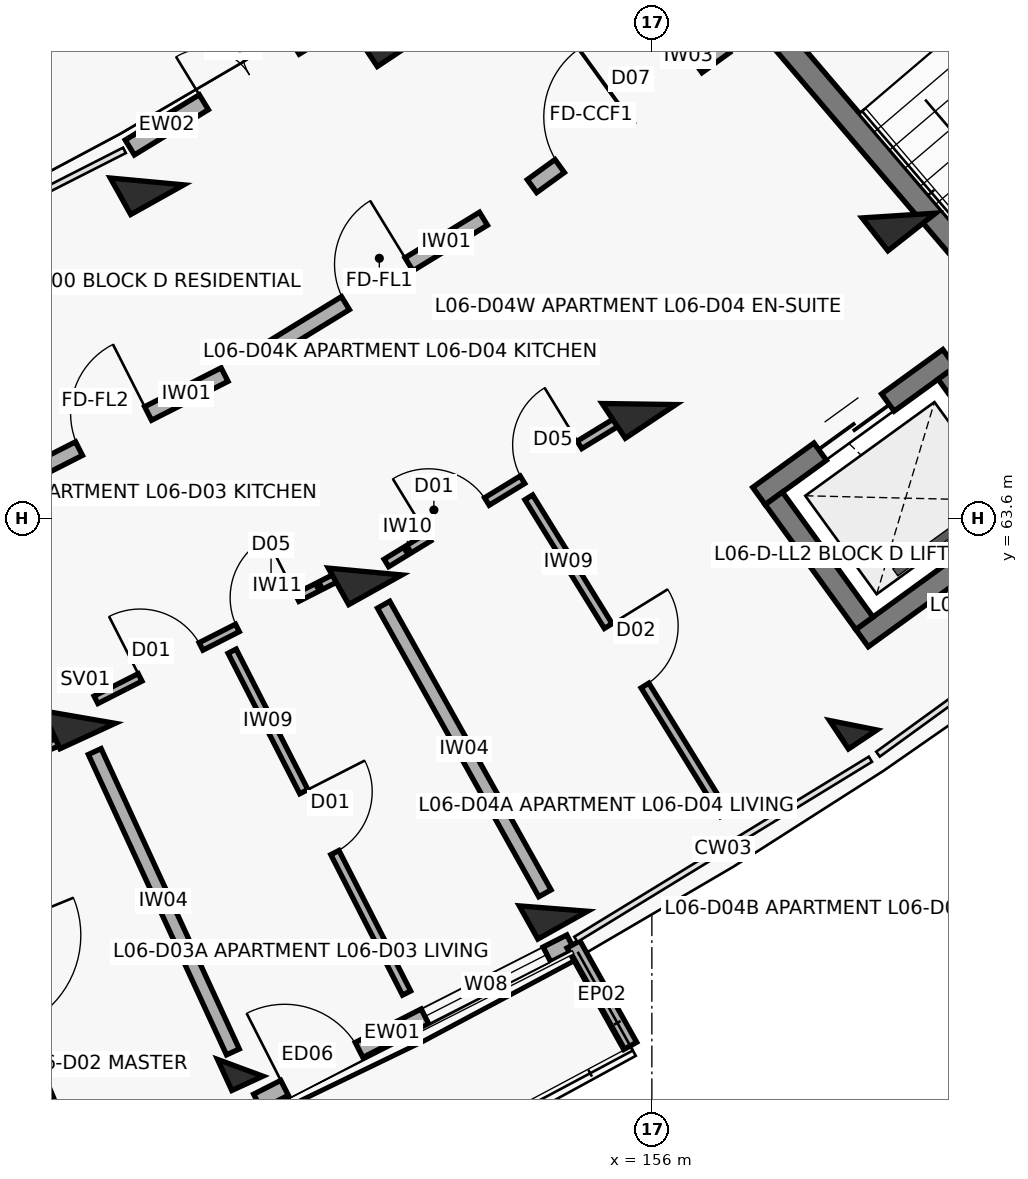
"""IFC4 building model, lengths in metres.
Left out: names, types, materials, properties, quantities, classifications, styles, units other than length and angle.
Written with IfcOpenShell. Run it as: python <this file> out.ifc"""

import sys

from ifc_helpers import new_model, si_unit, direction, frame, frame_2d, origin, origin_2d, place, context, subcontext, project, spatial, rectangle, extrude, element, fill, save


model = new_model("IFC4")
c1 = context("Model", 3, precision=1e-05, world=origin(), true_north=direction((0.0, 1.0)))
c2 = subcontext(c1, "Body", "Model", "MODEL_VIEW")
j1 = project(units=[si_unit("LENGTHUNIT", "METRE"), si_unit("PLANEANGLEUNIT", "RADIAN")], contexts=[c1])
p1 = place(None, origin())
s1 = spatial("IfcSite", under=j1, at=p1, CompositionType="ELEMENT")
p2 = place(p1, origin())
s2 = spatial("IfcBuilding", under=s1, at=p2, CompositionType="ELEMENT")
p3 = place(p2, frame((0.0, 0.0, 20.5)))
s3 = spatial("IfcBuildingStorey", under=s2, at=p3, CompositionType="ELEMENT", Elevation=20.5)
p4 = place(p3, frame((148.461, 60.982, 0.0), z_axis=(0.0, 0.0, 1.0), x_axis=(0.417867073801, -0.908508177527, 0.0)))
e1 = element("IfcColumn", 1, at=p4, inside=s3, PredefinedType="COLUMN", context=c2, shape_type="SweptSolid", body=[
    extrude(rectangle(XDim=0.55, YDim=0.8, at=origin_2d()), origin(), (0.0, 0.0, 1.0), 3.1),
])
p5 = place(p3, frame((150.584, 56.367, 0.0), z_axis=(0.0, 0.0, 1.0), x_axis=(0.417867073801, -0.908508177527, 0.0)))
e2 = element("IfcColumn", 2, at=p5, inside=s3, PredefinedType="COLUMN", context=c2, shape_type="SweptSolid", body=[
    extrude(rectangle(XDim=0.45, YDim=0.45, at=origin_2d()), origin(), (0.0, 0.0, 1.0), 3.1),
])
for number, where, z_axis, x_axis in (
    (3, (149.358, 68.03, 0.0), (0.0, 0.0, 1.0), (0.488, -0.873, 0.0)),
    (4, (152.227, 62.897, 0.0), (0.0, 0.0, 1.0), (0.488, -0.873, 0.0)),
):
    element("IfcColumn", number, at=place(p3, frame(where, z_axis=z_axis, x_axis=x_axis)), inside=s3, PredefinedType="COLUMN", context=c2, shape_type="SweptSolid", body=[
        extrude(rectangle(XDim=0.55, YDim=0.8, at=origin_2d()), origin(), (0.0, 0.0, 1.0), 3.1),
    ])
p6 = place(p3, frame((154.705, 58.462, 0.0), z_axis=(0.0, 0.0, 1.0), x_axis=(0.487859659139, -0.87292207727, 0.0)))
e5 = element("IfcColumn", 5, at=p6, inside=s3, PredefinedType="COLUMN", context=c2, shape_type="SweptSolid", body=[
    extrude(rectangle(XDim=0.5, YDim=0.75, at=origin_2d()), origin(), (0.0, 0.0, 1.0), 3.1),
])
for number, where, z_axis, x_axis in (
    (6, (152.568, 69.993, 0.0), (0.0, 0.0, 1.0), (0.555, -0.832, 0.0)),
    (7, (155.831, 65.101, 0.0), (0.0, 0.0, 1.0), (0.555, -0.832, 0.0)),
):
    element("IfcColumn", number, at=place(p3, frame(where, z_axis=z_axis, x_axis=x_axis)), inside=s3, PredefinedType="COLUMN", context=c2, shape_type="SweptSolid", body=[
        extrude(rectangle(XDim=0.55, YDim=0.8, at=origin_2d()), origin(), (0.0, 0.0, 1.0), 3.1),
    ])
p7 = place(p3, frame((158.649, 60.875, 0.0), z_axis=(0.0, 0.0, 1.0), x_axis=(0.554844427448, -0.83195412213, 0.0)))
e8 = element("IfcColumn", 8, at=p7, inside=s3, PredefinedType="COLUMN", context=c2, shape_type="SweptSolid", body=[
    extrude(rectangle(XDim=0.45, YDim=0.45, at=origin_2d()), origin(), (0.0, 0.0, 1.0), 3.1),
])
p8 = place(p3, frame((159.25, 67.581, 0.0), z_axis=(0.0, 0.0, 1.0), x_axis=(0.618408395358, -0.785856893175, 0.0)))
e9 = element("IfcColumn", 9, at=p8, inside=s3, PredefinedType="COLUMN", context=c2, shape_type="SweptSolid", body=[
    extrude(rectangle(XDim=0.55, YDim=0.8, at=origin_2d()), origin(), (0.0, 0.0, 1.0), 3.1),
])
p9 = place(p3, frame((150.811, 55.922, 0.0), z_axis=(0.0, 0.0, 1.0), x_axis=(0.891407190547, 0.453203288428, 0.0)))
e10 = element("IfcWall", 10, at=p9, inside=s3, PredefinedType="SOLIDWALL", context=c2, shape_type="SweptSolid", body=[
    extrude(rectangle(XDim=4.623, YDim=0.22, at=frame_2d((2.311, 0.0))), origin(), (0.0, 0.0, 1.0), 2.25),
])
p10 = place(p9, frame((0.4, 0.0, 0.0)))
e11 = element("IfcOpeningElement", 11, at=p10, cuts=e10, PredefinedType="OPENING", context=c2, shape_type="SweptSolid", body=[
    extrude(rectangle(XDim=1.1, YDim=2.15, at=frame_2d((0.55, 1.075))), frame((0.0, 0.12, 0.0), z_axis=(0.0, -1.0, 0.0), x_axis=(1.0, 0.0, 0.0)), (0.0, 0.0, 1.0), 0.24),
])
p11 = place(p9, frame((2.472, 0.0, 0.35)))
e12 = element("IfcOpeningElement", 12, at=p11, cuts=e10, PredefinedType="OPENING", context=c2, shape_type="SweptSolid", body=[
    extrude(rectangle(XDim=1.8, YDim=1.65, at=frame_2d((0.9, 0.825))), frame((0.0, 0.12, 0.0), z_axis=(0.0, -1.0, 0.0), x_axis=(1.0, 0.0, 0.0)), (0.0, 0.0, 1.0), 0.24),
])
p12 = place(p3, frame((154.969, 57.991, 0.0), z_axis=(0.0, 0.0, 1.0), x_axis=(0.487971560724, -0.872859528175, 0.0)))
e13 = element("IfcWall", 13, at=p12, inside=s3, PredefinedType="PARAPET", context=c2, shape_type="SweptSolid", body=[
    extrude(rectangle(XDim=1.53, YDim=0.195, at=frame_2d((0.765, 0.0))), origin(), (0.0, 0.0, 1.0), 2.25),
])
p13 = place(p3, frame((149.131, 68.477, 0.0), z_axis=(0.0, 0.0, 1.0), x_axis=(0.853122864819, 0.5217100512, 0.0)))
e14 = element("IfcWall", 14, at=p13, inside=s3, PredefinedType="SOLIDWALL", context=c2, shape_type="SweptSolid", body=[
    extrude(rectangle(XDim=3.683, YDim=0.23, at=frame_2d((1.842, 0.0))), origin(), (0.0, 0.0, 1.0), 2.25),
])
p14 = place(p13, frame((1.142, 0.0, 0.0)))
e15 = element("IfcOpeningElement", 15, at=p14, cuts=e14, PredefinedType="OPENING", context=c2, shape_type="SweptSolid", body=[
    extrude(rectangle(XDim=1.4, YDim=2.15, at=frame_2d((0.7, 1.075))), frame((0.0, 0.125, 0.0), z_axis=(0.0, -1.0, 0.0), x_axis=(1.0, 0.0, 0.0)), (0.0, 0.0, 1.0), 0.25),
])
p15 = place(p3, frame((144.583, 69.413, 0.0), z_axis=(0.0, 0.0, 1.0), x_axis=(0.863173571148, 0.504907304435, 0.0)))
e16 = element("IfcWall", 16, at=p15, inside=s3, PredefinedType="PARAPET", context=c2, shape_type="SweptSolid", body=[
    extrude(rectangle(XDim=8.727, YDim=0.18, at=frame_2d((4.364, 0.0))), origin(), (0.0, 0.0, 1.0), 0.25),
])
p16 = place(p3, frame((157.583, 70.041, 0.0), z_axis=(0.0, 0.0, 1.0), x_axis=(0.648762810187, -0.760990680704, 0.0)))
e17 = element("IfcWall", 17, at=p16, inside=s3, PredefinedType="SHEAR", context=c2, shape_type="SweptSolid", body=[
    extrude(rectangle(XDim=7.69, YDim=0.3, at=frame_2d((3.845, 0.0))), origin(), (0.0, 0.0, 1.0), 3.1),
])
p17 = place(p3, frame((157.409, 63.89, 0.0), z_axis=(0.0, 0.0, 1.0), x_axis=(0.809510936031, 0.587104798521, 0.0)))
e18 = element("IfcWall", 18, at=p17, inside=s3, PredefinedType="SHEAR", context=c2, shape_type="SweptSolid", body=[
    extrude(rectangle(XDim=3.09, YDim=0.28, at=frame_2d((1.545, 0.0))), origin(), (0.0, 0.0, 1.0), 3.1),
])
p18 = place(p17, frame((0.995, 0.0, 0.0)))
e19 = element("IfcOpeningElement", 19, at=p18, cuts=e18, PredefinedType="OPENING", context=c2, shape_type="SweptSolid", body=[
    extrude(rectangle(XDim=1.1, YDim=2.15, at=frame_2d((0.55, 1.075))), frame((0.0, 0.15, 0.0), z_axis=(0.0, -1.0, 0.0), x_axis=(1.0, 0.0, 0.0)), (0.0, 0.0, 1.0), 0.3),
])
p19 = place(p3, frame((158.765, 62.021, 0.0), z_axis=(0.0, 0.0, 1.0), x_axis=(0.809548485838, 0.587053020669, 0.0)))
e20 = element("IfcWall", 20, at=p19, inside=s3, PredefinedType="SHEAR", context=c2, shape_type="SweptSolid", body=[
    extrude(rectangle(XDim=3.09, YDim=0.28, at=frame_2d((1.545, 0.0))), origin(), (0.0, 0.0, 1.0), 3.1),
])
p20 = place(p3, frame((157.604, 63.859, 0.0), z_axis=(0.0, 0.0, 1.0), x_axis=(0.587127188998, -0.809494696671, 0.0)))
e21 = element("IfcWall", 21, at=p20, inside=s3, PredefinedType="SHEAR", context=c2, shape_type="SweptSolid", body=[
    extrude(rectangle(XDim=2.03, YDim=0.28, at=frame_2d((1.015, 0.0))), origin(), (0.0, 0.0, 1.0), 3.1),
])
p21 = place(p3, frame((159.879, 65.509, 0.0), z_axis=(0.0, 0.0, 1.0), x_axis=(0.58704837408, -0.809551855344, 0.0)))
e22 = element("IfcWall", 22, at=p21, inside=s3, PredefinedType="SHEAR", context=c2, shape_type="SweptSolid", body=[
    extrude(rectangle(XDim=2.03, YDim=0.28, at=frame_2d((1.015, 0.0))), origin(), (0.0, 0.0, 1.0), 3.1),
])
p22 = place(p3, frame((144.903, 59.296, 0.0), z_axis=(0.0, 0.0, 1.0), x_axis=(0.924207914011, 0.381889685223, 0.0)))
e23 = element("IfcWall", 23, at=p22, inside=s3, PredefinedType="PARTITIONING", context=c2, shape_type="SweptSolid", body=[
    extrude(rectangle(XDim=3.64, YDim=0.105, at=frame_2d((1.82, 0.0))), origin(), (0.0, 0.0, 1.0), 2.08),
])
p23 = place(p22, frame((0.65, 0.0, 0.0)))
e24 = element("IfcOpeningElement", 24, at=p23, cuts=e23, PredefinedType="OPENING", context=c2, shape_type="SweptSolid", body=[
    extrude(rectangle(XDim=0.9, YDim=2.1, at=frame_2d((0.45, 1.05))), frame((0.0, 0.062, 0.0), z_axis=(0.0, -1.0, 0.0), x_axis=(1.0, 0.0, 0.0)), (0.0, 0.0, 1.0), 0.125),
])
p24 = place(p22, frame((2.11, 0.0, 0.0)))
e25 = element("IfcOpeningElement", 25, at=p24, cuts=e23, PredefinedType="OPENING", context=c2, shape_type="SweptSolid", body=[
    extrude(rectangle(XDim=0.88, YDim=2.1, at=frame_2d((0.44, 1.05))), frame((0.0, 0.062, 0.0), z_axis=(0.0, -1.0, 0.0), x_axis=(1.0, 0.0, 0.0)), (0.0, 0.0, 1.0), 0.125),
])
p25 = place(p3, frame((146.533, 59.708, 0.0), z_axis=(0.0, 0.0, 1.0), x_axis=(0.379167145653, -0.925328198888, 0.0)))
e26 = element("IfcWall", 26, at=p25, inside=s3, PredefinedType="PARTITIONING", context=c2, shape_type="SweptSolid", body=[
    extrude(rectangle(XDim=4.75, YDim=0.12, at=frame_2d((2.375, 0.0))), origin(), (0.0, 0.0, 1.0), 2.08),
])
p26 = place(p25, frame((1.725, 0.0, 0.0)))
e27 = element("IfcOpeningElement", 27, at=p26, cuts=e26, PredefinedType="OPENING", context=c2, shape_type="SweptSolid", body=[
    extrude(rectangle(XDim=1.3, YDim=2.1, at=frame_2d((0.65, 1.05))), frame((0.0, 0.07, 0.0), z_axis=(0.0, -1.0, 0.0), x_axis=(1.0, 0.0, 0.0)), (0.0, 0.0, 1.0), 0.14),
])
p27 = place(p3, frame((147.457, 64.003, 0.0), z_axis=(0.0, 0.0, 1.0), x_axis=(0.891412167565, 0.45319349898, 0.0)))
e28 = element("IfcWall", 28, at=p27, inside=s3, PredefinedType="SOLIDWALL", context=c2, shape_type="SweptSolid", body=[
    extrude(rectangle(XDim=3.277, YDim=0.2, at=frame_2d((1.639, 0.0))), origin(), (0.0, 0.0, 1.0), 2.08),
])
p28 = place(p27, frame((1.128, 0.0, 0.0)))
e29 = element("IfcOpeningElement", 29, at=p28, cuts=e28, PredefinedType="OPENING", context=c2, shape_type="SweptSolid", body=[
    extrude(rectangle(XDim=1.02, YDim=2.15, at=frame_2d((0.51, 1.075))), frame((0.0, 0.11, 0.0), z_axis=(0.0, -1.0, 0.0), x_axis=(1.0, 0.0, 0.0)), (0.0, 0.0, 1.0), 0.22),
])
p29 = place(p3, frame((148.687, 61.209, 0.0), z_axis=(0.0, 0.0, 1.0), x_axis=(0.891396224028, 0.453224857866, 0.0)))
e30 = element("IfcWall", 30, at=p29, inside=s3, PredefinedType="PARTITIONING", context=c2, shape_type="SweptSolid", body=[
    extrude(rectangle(XDim=3.617, YDim=0.11, at=frame_2d((1.808, 0.0))), origin(), (0.0, 0.0, 1.0), 2.08),
])
p30 = place(p29, frame((0.65, 0.0, 0.0)))
e31 = element("IfcOpeningElement", 31, at=p30, cuts=e30, PredefinedType="OPENING", context=c2, shape_type="SweptSolid", body=[
    extrude(rectangle(XDim=0.9, YDim=2.1, at=frame_2d((0.45, 1.05))), frame((0.0, 0.065, 0.0), z_axis=(0.0, -1.0, 0.0), x_axis=(1.0, 0.0, 0.0)), (0.0, 0.0, 1.0), 0.13),
])
p31 = place(p29, frame((2.086, 0.0, 0.0)))
e32 = element("IfcOpeningElement", 32, at=p31, cuts=e30, PredefinedType="OPENING", context=c2, shape_type="SweptSolid", body=[
    extrude(rectangle(XDim=0.88, YDim=2.1, at=frame_2d((0.44, 1.05))), frame((0.0, 0.065, 0.0), z_axis=(0.0, -1.0, 0.0), x_axis=(1.0, 0.0, 0.0)), (0.0, 0.0, 1.0), 0.13),
])
p32 = place(p3, frame((150.478, 61.849, 0.0), z_axis=(0.0, 0.0, 1.0), x_axis=(0.454489129902, -0.890752283635, 0.0)))
e33 = element("IfcWall", 33, at=p32, inside=s3, PredefinedType="PARTITIONING", context=c2, shape_type="SweptSolid", body=[
    extrude(rectangle(XDim=5.05, YDim=0.12, at=frame_2d((2.525, 0.0))), origin(), (0.0, 0.0, 1.0), 2.08),
])
p33 = place(p32, frame((2.075, 0.0, 0.0)))
e34 = element("IfcOpeningElement", 34, at=p33, cuts=e33, PredefinedType="OPENING", context=c2, shape_type="SweptSolid", body=[
    extrude(rectangle(XDim=0.9, YDim=2.1, at=frame_2d((0.45, 1.05))), frame((0.0, 0.07, 0.0), z_axis=(0.0, -1.0, 0.0), x_axis=(1.0, 0.0, 0.0)), (0.0, 0.0, 1.0), 0.14),
])
p34 = place(p3, frame((148.67, 60.528, 0.0), z_axis=(0.0, 0.0, 1.0), x_axis=(0.417837051164, -0.908521985796, 0.0)))
e35 = element("IfcWall", 35, at=p34, inside=s3, PredefinedType="SOLIDWALL", context=c2, shape_type="SweptSolid", body=[
    extrude(rectangle(XDim=4.35, YDim=0.185, at=frame_2d((2.175, 0.0))), origin(), (0.0, 0.0, 1.0), 2.08),
])
p35 = place(p3, frame((150.989, 65.829, 0.0), z_axis=(0.0, 0.0, 1.0), x_axis=(0.853090237845, 0.521763400492, 0.0)))
e36 = element("IfcWall", 36, at=p35, inside=s3, PredefinedType="SOLIDWALL", context=c2, shape_type="SweptSolid", body=[
    extrude(rectangle(XDim=3.277, YDim=0.2, at=frame_2d((1.638, 0.0))), origin(), (0.0, 0.0, 1.0), 2.08),
])
p36 = place(p35, frame((1.148, 0.0, 0.0)))
e37 = element("IfcOpeningElement", 37, at=p36, cuts=e36, PredefinedType="OPENING", context=c2, shape_type="SweptSolid", body=[
    extrude(rectangle(XDim=0.98, YDim=2.15, at=frame_2d((0.49, 1.075))), frame((0.0, 0.11, 0.0), z_axis=(0.0, -1.0, 0.0), x_axis=(1.0, 0.0, 0.0)), (0.0, 0.0, 1.0), 0.22),
])
p37 = place(p3, frame((152.507, 63.01, 0.0), z_axis=(0.0, 0.0, 1.0), x_axis=(0.853110474662, 0.521730311581, 0.0)))
e38 = element("IfcWall", 38, at=p37, inside=s3, PredefinedType="PARTITIONING", context=c2, shape_type="SweptSolid", body=[
    extrude(rectangle(XDim=3.628, YDim=0.115, at=frame_2d((1.814, 0.0))), origin(), (0.0, 0.0, 1.0), 2.08),
])
p38 = place(p37, frame((0.65, 0.0, 0.0)))
e39 = element("IfcOpeningElement", 39, at=p38, cuts=e38, PredefinedType="OPENING", context=c2, shape_type="SweptSolid", body=[
    extrude(rectangle(XDim=0.9, YDim=2.1, at=frame_2d((0.45, 1.05))), frame((0.0, 0.067, 0.0), z_axis=(0.0, -1.0, 0.0), x_axis=(1.0, 0.0, 0.0)), (0.0, 0.0, 1.0), 0.135),
])
p39 = place(p37, frame((2.098, 0.0, 0.0)))
e40 = element("IfcOpeningElement", 40, at=p39, cuts=e38, PredefinedType="OPENING", context=c2, shape_type="SweptSolid", body=[
    extrude(rectangle(XDim=0.88, YDim=2.1, at=frame_2d((0.44, 1.05))), frame((0.0, 0.067, 0.0), z_axis=(0.0, -1.0, 0.0), x_axis=(1.0, 0.0, 0.0)), (0.0, 0.0, 1.0), 0.135),
])
p40 = place(p3, frame((154.38, 63.873, 0.0), z_axis=(0.0, 0.0, 1.0), x_axis=(0.525458935368, -0.850818962672, 0.0)))
e41 = element("IfcWall", 41, at=p40, inside=s3, PredefinedType="PARTITIONING", context=c2, shape_type="SweptSolid", body=[
    extrude(rectangle(XDim=4.9, YDim=0.12, at=frame_2d((2.45, 0.0))), origin(), (0.0, 0.0, 1.0), 2.08),
])
p41 = place(p40, frame((1.99, 0.0, 0.0)))
e42 = element("IfcOpeningElement", 42, at=p41, cuts=e41, PredefinedType="OPENING", context=c2, shape_type="SweptSolid", body=[
    extrude(rectangle(XDim=0.92, YDim=2.1, at=frame_2d((0.46, 1.05))), frame((0.0, 0.07, 0.0), z_axis=(0.0, -1.0, 0.0), x_axis=(1.0, 0.0, 0.0)), (0.0, 0.0, 1.0), 0.14),
])
p42 = place(p3, frame((152.471, 62.46, 0.0), z_axis=(0.0, 0.0, 1.0), x_axis=(0.487866639184, -0.872918176218, 0.0)))
e43 = element("IfcWall", 43, at=p42, inside=s3, PredefinedType="SOLIDWALL", context=c2, shape_type="SweptSolid", body=[
    extrude(rectangle(XDim=4.35, YDim=0.185, at=frame_2d((2.175, 0.0))), origin(), (0.0, 0.0, 1.0), 2.08),
])
p43 = place(p3, frame((154.423, 67.968, 0.0), z_axis=(0.0, 0.0, 1.0), x_axis=(0.809516127005, 0.587097641043, 0.0)))
e44 = element("IfcWall", 44, at=p43, inside=s3, PredefinedType="SOLIDWALL", context=c2, shape_type="SweptSolid", body=[
    extrude(rectangle(XDim=3.137, YDim=0.21, at=frame_2d((1.569, 0.0))), origin(), (0.0, 0.0, 1.0), 2.08),
])
p44 = place(p43, frame((0.45, 0.0, 0.0)))
e45 = element("IfcOpeningElement", 45, at=p44, cuts=e44, PredefinedType="OPENING", context=c2, shape_type="SweptSolid", body=[
    extrude(rectangle(XDim=1.1, YDim=2.15, at=frame_2d((0.55, 1.075))), frame((0.0, 0.115, 0.0), z_axis=(0.0, -1.0, 0.0), x_axis=(1.0, 0.0, 0.0)), (0.0, 0.0, 1.0), 0.23),
])
p45 = place(p43, frame((1.567, 0.0, 0.0)))
e46 = element("IfcOpeningElement", 46, at=p45, cuts=e44, PredefinedType="OPENING", context=c2, shape_type="SweptSolid", body=[
    extrude(rectangle(XDim=1.12, YDim=2.15, at=frame_2d((0.56, 1.075))), frame((0.0, 0.115, 0.0), z_axis=(0.0, -1.0, 0.0), x_axis=(1.0, 0.0, 0.0)), (0.0, 0.0, 1.0), 0.23),
])
p46 = place(p10, origin())
e47 = element("IfcDoor", 47, at=p46, inside=s3, OperationType="SINGLE_SWING_LEFT", PredefinedType="DOOR", context=c2, shape_type="SweptSolid", body=[
    extrude(rectangle(XDim=1.1, YDim=2.15, at=frame_2d((0.55, 1.075))), frame((0.0, 0.025, 0.0), z_axis=(0.0, -1.0, 0.0), x_axis=(1.0, 0.0, 0.0)), (0.0, 0.0, 1.0), 0.05),
])
fill(e11, e47)
p47 = place(p11, origin())
e48 = element("IfcWindow", 48, at=p47, inside=s3, PartitioningType="TRIPLE_PANEL_VERTICAL", PredefinedType="WINDOW", context=c2, shape_type="SweptSolid", body=[
    extrude(rectangle(XDim=1.8, YDim=1.65, at=frame_2d((0.9, 0.825))), frame((0.0, 0.03, 0.0), z_axis=(0.0, -1.0, 0.0), x_axis=(1.0, 0.0, 0.0)), (0.0, 0.0, 1.0), 0.06),
])
fill(e12, e48)
p48 = place(p14, origin())
e49 = element("IfcDoor", 49, at=p48, inside=s3, OperationType="DOUBLE_DOOR_SINGLE_SWING", PredefinedType="DOOR", context=c2, shape_type="SweptSolid", body=[
    extrude(rectangle(XDim=1.4, YDim=2.15, at=frame_2d((0.7, 1.075))), frame((0.0, 0.025, 0.0), z_axis=(0.0, -1.0, 0.0), x_axis=(1.0, 0.0, 0.0)), (0.0, 0.0, 1.0), 0.05),
])
fill(e15, e49)
p49 = place(p18, origin())
e50 = element("IfcDoor", 50, at=p49, inside=s3, OperationType="DOUBLE_DOOR_SLIDING", PredefinedType="DOOR", context=c2, shape_type="SweptSolid", body=[
    extrude(rectangle(XDim=1.1, YDim=2.15, at=frame_2d((0.55, 1.075))), frame((0.0, 0.025, 0.0), z_axis=(0.0, -1.0, 0.0), x_axis=(1.0, 0.0, 0.0)), (0.0, 0.0, 1.0), 0.05),
])
fill(e19, e50)
p50 = place(p28, origin())
e51 = element("IfcDoor", 51, at=p50, inside=s3, OperationType="SINGLE_SWING_RIGHT", PredefinedType="DOOR", context=c2, shape_type="SweptSolid", body=[
    extrude(rectangle(XDim=1.02, YDim=2.15, at=frame_2d((0.51, 1.075))), frame((0.0, 0.025, 0.0), z_axis=(0.0, -1.0, 0.0), x_axis=(1.0, 0.0, 0.0)), (0.0, 0.0, 1.0), 0.05),
])
fill(e29, e51)
p51 = place(p30, origin())
e52 = element("IfcDoor", 52, at=p51, inside=s3, OperationType="SINGLE_SWING_LEFT", PredefinedType="DOOR", context=c2, shape_type="SweptSolid", body=[
    extrude(rectangle(XDim=0.9, YDim=2.1, at=frame_2d((0.45, 1.05))), frame((0.0, 0.025, 0.0), z_axis=(0.0, -1.0, 0.0), x_axis=(1.0, 0.0, 0.0)), (0.0, 0.0, 1.0), 0.05),
])
fill(e31, e52)
p52 = place(p31, origin())
e53 = element("IfcDoor", 53, at=p52, inside=s3, OperationType="SINGLE_SWING_RIGHT", PredefinedType="DOOR", context=c2, shape_type="SweptSolid", body=[
    extrude(rectangle(XDim=0.88, YDim=2.1, at=frame_2d((0.44, 1.05))), frame((0.0, 0.025, 0.0), z_axis=(0.0, -1.0, 0.0), x_axis=(1.0, 0.0, 0.0)), (0.0, 0.0, 1.0), 0.05),
])
fill(e32, e53)
p53 = place(p33, origin())
e54 = element("IfcDoor", 54, at=p53, inside=s3, OperationType="SINGLE_SWING_LEFT", PredefinedType="DOOR", context=c2, shape_type="SweptSolid", body=[
    extrude(rectangle(XDim=0.9, YDim=2.1, at=frame_2d((0.45, 1.05))), frame((0.0, 0.025, 0.0), z_axis=(0.0, -1.0, 0.0), x_axis=(1.0, 0.0, 0.0)), (0.0, 0.0, 1.0), 0.05),
])
fill(e34, e54)
p54 = place(p36, origin())
e55 = element("IfcDoor", 55, at=p54, inside=s3, OperationType="SINGLE_SWING_RIGHT", PredefinedType="DOOR", context=c2, shape_type="SweptSolid", body=[
    extrude(rectangle(XDim=0.98, YDim=2.15, at=frame_2d((0.49, 1.075))), frame((0.0, 0.025, 0.0), z_axis=(0.0, -1.0, 0.0), x_axis=(1.0, 0.0, 0.0)), (0.0, 0.0, 1.0), 0.05),
])
fill(e37, e55)
p55 = place(p38, origin())
e56 = element("IfcDoor", 56, at=p55, inside=s3, OperationType="SINGLE_SWING_LEFT", PredefinedType="DOOR", context=c2, shape_type="SweptSolid", body=[
    extrude(rectangle(XDim=0.9, YDim=2.1, at=frame_2d((0.45, 1.05))), frame((0.0, 0.025, 0.0), z_axis=(0.0, -1.0, 0.0), x_axis=(1.0, 0.0, 0.0)), (0.0, 0.0, 1.0), 0.05),
])
fill(e39, e56)
p56 = place(p39, origin())
e57 = element("IfcDoor", 57, at=p56, inside=s3, OperationType="SINGLE_SWING_RIGHT", PredefinedType="DOOR", context=c2, shape_type="SweptSolid", body=[
    extrude(rectangle(XDim=0.88, YDim=2.1, at=frame_2d((0.44, 1.05))), frame((0.0, 0.025, 0.0), z_axis=(0.0, -1.0, 0.0), x_axis=(1.0, 0.0, 0.0)), (0.0, 0.0, 1.0), 0.05),
])
fill(e40, e57)
p57 = place(p41, origin())
e58 = element("IfcDoor", 58, at=p57, inside=s3, OperationType="SINGLE_SWING_LEFT", PredefinedType="DOOR", context=c2, shape_type="SweptSolid", body=[
    extrude(rectangle(XDim=0.92, YDim=2.1, at=frame_2d((0.46, 1.05))), frame((0.0, 0.025, 0.0), z_axis=(0.0, -1.0, 0.0), x_axis=(1.0, 0.0, 0.0)), (0.0, 0.0, 1.0), 0.05),
])
fill(e42, e58)
p58 = place(p44, origin())
e59 = element("IfcDoor", 59, at=p58, inside=s3, OperationType="SINGLE_SWING_RIGHT", PredefinedType="DOOR", context=c2, shape_type="SweptSolid", body=[
    extrude(rectangle(XDim=1.1, YDim=2.15, at=frame_2d((0.55, 1.075))), frame((0.0, 0.025, 0.0), z_axis=(0.0, -1.0, 0.0), x_axis=(1.0, 0.0, 0.0)), (0.0, 0.0, 1.0), 0.05),
])
fill(e45, e59)
p59 = place(p45, origin())
e60 = element("IfcDoor", 60, at=p59, inside=s3, OperationType="SINGLE_SWING_LEFT", PredefinedType="DOOR", context=c2, shape_type="SweptSolid", body=[
    extrude(rectangle(XDim=1.12, YDim=2.15, at=frame_2d((0.56, 1.075))), frame((0.0, 0.025, 0.0), z_axis=(0.0, -1.0, 0.0), x_axis=(1.0, 0.0, 0.0)), (0.0, 0.0, 1.0), 0.05),
])
fill(e46, e60)
save(model, sys.argv[1])
